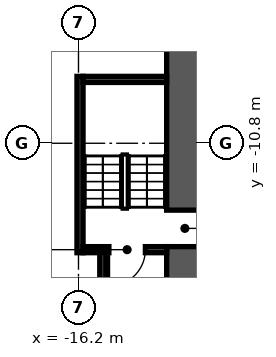
"""IFC4 building model, lengths in metres.
Left out: names, types, materials, properties, quantities, classifications, styles, units other than length and angle.
Written with IfcOpenShell. Run it as: python <this file> out.ifc"""

import sys

from ifc_helpers import new_model, si_unit, direction, frame, frame_2d, origin, place, context, subcontext, project, spatial, rectangle, extrude, element, fill, save


model = new_model("IFC4")
c1 = context("Model", 3, precision=1e-05, world=origin(), true_north=direction((0.0, 1.0)))
c2 = subcontext(c1, "Body", "Model", "MODEL_VIEW")
j1 = project(units=[si_unit("LENGTHUNIT", "METRE"), si_unit("PLANEANGLEUNIT", "RADIAN")], contexts=[c1])
p1 = place(None, origin())
s1 = spatial("IfcSite", under=j1, at=p1, CompositionType="ELEMENT")
p2 = place(p1, origin())
s2 = spatial("IfcBuilding", under=s1, at=p2, CompositionType="ELEMENT")
p3 = place(p2, origin())
s3 = spatial("IfcBuildingStorey", under=s2, at=p3, CompositionType="ELEMENT", Elevation=0.0)
p4 = place(p3, frame((-12.7, -17.8, 0.0), z_axis=(0.0, 0.0, 1.0), x_axis=(0.0, 1.0, 0.0)))
e1 = element("IfcWall", 1, at=p4, inside=s3, PredefinedType="SHEAR", context=c2, shape_type="SweptSolid", body=[
    extrude(rectangle(XDim=11.6, YDim=1.2, at=frame_2d((5.8, 0.0))), origin(), (0.0, 0.0, 1.0), 4.55),
])
p5 = place(p4, frame((3.6, 0.0, 0.0)))
e2 = element("IfcOpeningElement", 2, at=p5, cuts=e1, PredefinedType="OPENING", context=c2, shape_type="SweptSolid", body=[
    extrude(rectangle(XDim=1.2, YDim=2.1, at=frame_2d((0.6, 1.05))), frame((0.0, 0.61, 0.0), z_axis=(0.0, -1.0, 0.0), x_axis=(1.0, 0.0, 0.0)), (0.0, 0.0, 1.0), 1.22),
])
p6 = place(p3, frame((-15.4, -18.9, 0.0), z_axis=(0.0, 0.0, 1.0), x_axis=(0.0, 1.0, 0.0)))
e3 = element("IfcWall", 3, at=p6, inside=s3, PredefinedType="SOLIDWALL", context=c2, shape_type="SweptSolid", body=[
    extrude(rectangle(XDim=4.58, YDim=0.2, at=frame_2d((2.29, 0.0))), origin(), (0.0, 0.0, 1.0), 4.55),
])
p7 = place(p3, frame((-16.15, -14.4, 0.0), z_axis=(0.0, 0.0, 1.0), x_axis=(0.0, 1.0, 0.0)))
e4 = element("IfcWall", 4, at=p7, inside=s3, PredefinedType="SOLIDWALL", context=c2, shape_type="SweptSolid", body=[
    extrude(rectangle(XDim=5.8, YDim=0.2, at=frame_2d((2.9, 0.0))), origin(), (0.0, 0.0, 1.0), 4.55),
])
p8 = place(p3, frame((-16.05, -14.3, 0.0), z_axis=(0.0, 0.0, 1.0), x_axis=(1.0, 0.0, 0.0)))
e5 = element("IfcWall", 5, at=p8, inside=s3, PredefinedType="SOLIDWALL", context=c2, shape_type="SweptSolid", body=[
    extrude(rectangle(XDim=2.75, YDim=0.2, at=frame_2d((1.375, 0.0))), origin(), (0.0, 0.0, 1.0), 4.55),
])
p9 = place(p8, frame((2.05, 0.0, 0.0), z_axis=(0.0, 0.0, 1.0), x_axis=(-1.0, 0.0, 0.0)))
e6 = element("IfcOpeningElement", 6, at=p9, cuts=e5, PredefinedType="OPENING", context=c2, shape_type="SweptSolid", body=[
    extrude(rectangle(XDim=1.2, YDim=2.1, at=frame_2d((0.6, 1.05))), frame((0.0, 0.11, 0.0), z_axis=(0.0, -1.0, 0.0), x_axis=(1.0, 0.0, 0.0)), (0.0, 0.0, 1.0), 0.22),
])
p10 = place(p3, frame((-16.05, -8.7, 0.0), z_axis=(0.0, 0.0, 1.0), x_axis=(1.0, 0.0, 0.0)))
e7 = element("IfcWall", 7, at=p10, inside=s3, PredefinedType="SOLIDWALL", context=c2, shape_type="SweptSolid", body=[
    extrude(rectangle(XDim=2.75, YDim=0.2, at=frame_2d((1.375, 0.0))), origin(), (0.0, 0.0, 1.0), 4.55),
])
p11 = place(p5, origin())
e8 = element("IfcDoor", 8, at=p11, inside=s3, OperationType="SINGLE_SWING_RIGHT", PredefinedType="DOOR", context=c2, shape_type="SweptSolid", body=[
    extrude(rectangle(XDim=1.2, YDim=2.1, at=frame_2d((0.6, 1.05))), frame((0.0, 0.025, 0.0), z_axis=(0.0, -1.0, 0.0), x_axis=(1.0, 0.0, 0.0)), (0.0, 0.0, 1.0), 0.05),
])
fill(e2, e8)
p12 = place(p9, origin())
e9 = element("IfcDoor", 9, at=p12, inside=s3, OperationType="SINGLE_SWING_RIGHT", PredefinedType="DOOR", context=c2, shape_type="SweptSolid", body=[
    extrude(rectangle(XDim=1.2, YDim=2.1, at=frame_2d((0.6, 1.05))), frame((0.0, 0.025, 0.0), z_axis=(0.0, -1.0, 0.0), x_axis=(1.0, 0.0, 0.0)), (0.0, 0.0, 1.0), 0.05),
])
fill(e6, e9)
save(model, sys.argv[1])
